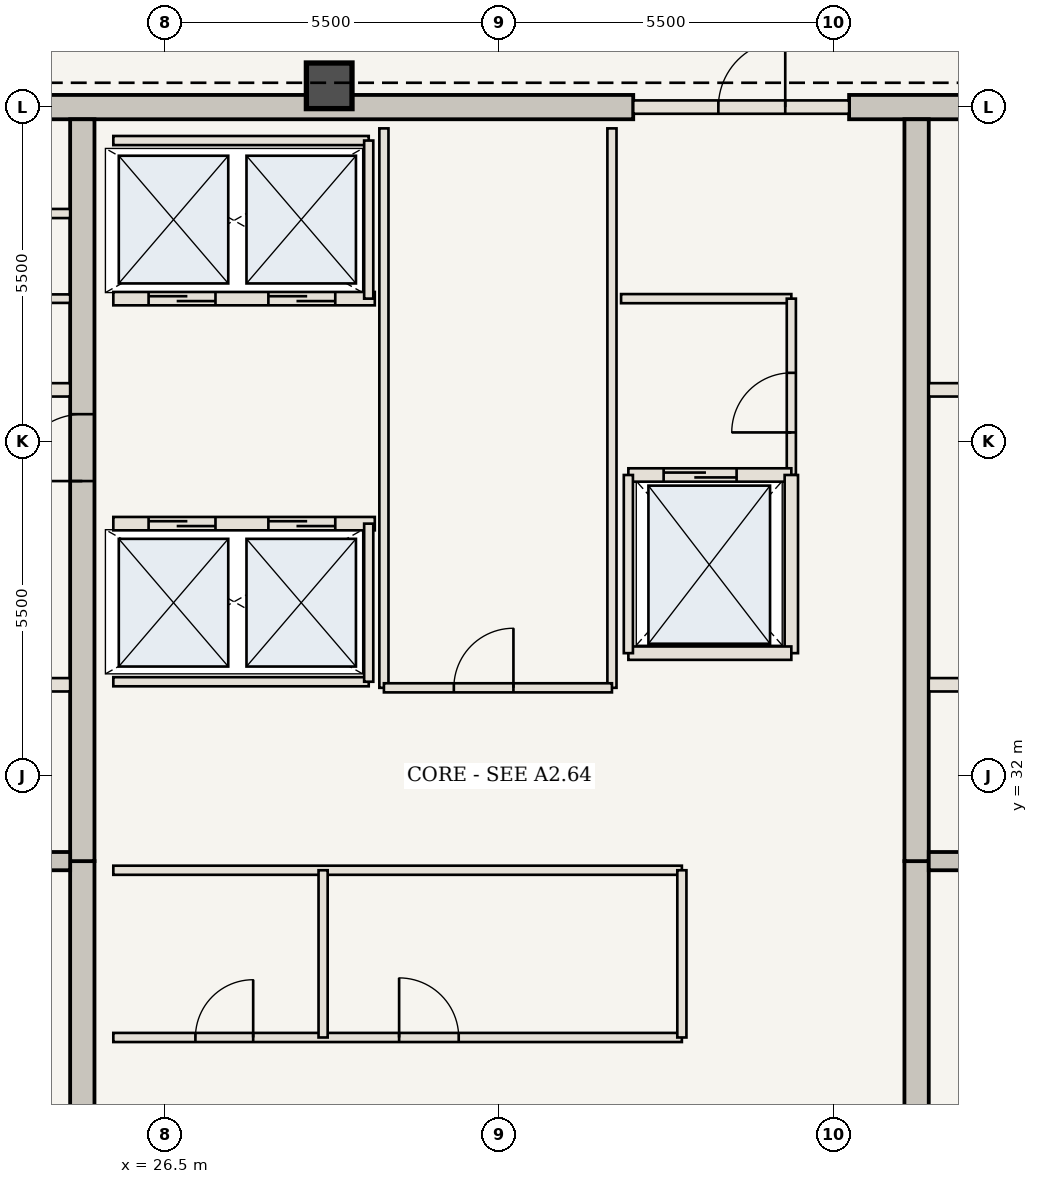
"""IFC4 building model, lengths in metres.
Left out: names, types, materials, properties, quantities, classifications, styles, units other than length and angle.
Written with IfcOpenShell. Run it as: python <this file> out.ifc"""

import sys

from ifc_helpers import new_model, si_unit, direction, frame, frame_2d, origin, origin_2d, place, context, subcontext, project, spatial, rectangle, extrude, element, fill, save


model = new_model("IFC4")
c1 = context("Model", 3, precision=1e-05, world=origin(), true_north=direction((0.0, 1.0)))
c2 = subcontext(c1, "Body", "Model", "MODEL_VIEW")
j1 = project(units=[si_unit("LENGTHUNIT", "METRE"), si_unit("PLANEANGLEUNIT", "RADIAN")], contexts=[c1])
p1 = place(None, origin())
s1 = spatial("IfcSite", under=j1, at=p1, CompositionType="ELEMENT")
p2 = place(p1, origin())
s2 = spatial("IfcBuilding", under=s1, at=p2, CompositionType="ELEMENT")
p3 = place(p2, frame((0.0, 0.0, 296.8)))
s3 = spatial("IfcBuildingStorey", under=s2, at=p3, CompositionType="ELEMENT", Elevation=296.8)
p4 = place(p3, frame((21.41, 43.0, 0.0), z_axis=(0.0, 0.0, 1.0), x_axis=(1.0, 0.0, 0.0)))
e1 = element("IfcWall", 1, at=p4, inside=s3, PredefinedType="SHEAR", context=c2, shape_type="SweptSolid", body=[
    extrude(rectangle(XDim=12.79, YDim=0.4, at=frame_2d((6.395, 0.0))), origin(), (0.0, 0.0, 1.0), 3.85),
])
p5 = place(p3, frame((37.75, 43.0, 0.0), z_axis=(0.0, 0.0, 1.0), x_axis=(1.0, 0.0, 0.0)))
e2 = element("IfcWall", 2, at=p5, inside=s3, PredefinedType="SHEAR", context=c2, shape_type="SweptSolid", body=[
    extrude(rectangle(XDim=4.84, YDim=0.4, at=frame_2d((2.42, 0.0))), origin(), (0.0, 0.0, 1.0), 3.85),
])
p6 = place(p3, frame((25.14, 21.15, 0.0), z_axis=(0.0, 0.0, 1.0), x_axis=(0.0, 1.0, 0.0)))
e3 = element("IfcWall", 3, at=p6, inside=s3, PredefinedType="SHEAR", context=c2, shape_type="SweptSolid", body=[
    extrude(rectangle(XDim=9.45, YDim=0.4, at=frame_2d((4.725, 0.0))), origin(), (0.0, 0.0, 1.0), 3.85),
])
p7 = place(p3, frame((25.14, 30.6, 0.0), z_axis=(0.0, 0.0, 1.0), x_axis=(0.0, 1.0, 0.0)))
e4 = element("IfcWall", 4, at=p7, inside=s3, PredefinedType="SHEAR", context=c2, shape_type="SweptSolid", body=[
    extrude(rectangle(XDim=12.2, YDim=0.4, at=frame_2d((6.1, 0.0))), origin(), (0.0, 0.0, 1.0), 3.85),
])
p8 = place(p7, frame((6.25, 0.0, 0.0)))
e5 = element("IfcOpeningElement", 5, at=p8, cuts=e4, PredefinedType="OPENING", context=c2, shape_type="SweptSolid", body=[
    extrude(rectangle(XDim=1.1, YDim=2.15, at=frame_2d((0.55, 1.075))), frame((0.0, 0.21, 0.0), z_axis=(0.0, -1.0, 0.0), x_axis=(1.0, 0.0, 0.0)), (0.0, 0.0, 1.0), 0.42),
])
p9 = place(p3, frame((38.86, 21.15, 0.0), z_axis=(0.0, 0.0, 1.0), x_axis=(0.0, 1.0, 0.0)))
e6 = element("IfcWall", 6, at=p9, inside=s3, PredefinedType="SHEAR", context=c2, shape_type="SweptSolid", body=[
    extrude(rectangle(XDim=9.45, YDim=0.4, at=frame_2d((4.725, 0.0))), origin(), (0.0, 0.0, 1.0), 3.85),
])
p10 = place(p3, frame((38.86, 30.6, 0.0), z_axis=(0.0, 0.0, 1.0), x_axis=(0.0, 1.0, 0.0)))
e7 = element("IfcWall", 7, at=p10, inside=s3, PredefinedType="SHEAR", context=c2, shape_type="SweptSolid", body=[
    extrude(rectangle(XDim=12.2, YDim=0.4, at=frame_2d((6.1, 0.0))), origin(), (0.0, 0.0, 1.0), 3.85),
])
p11 = place(p3, frame((29.2, 43.35, 0.0), z_axis=(0.0, 0.0, 1.0), x_axis=(1.0, 0.0, 0.0)))
e8 = element("IfcColumn", 8, at=p11, inside=s3, PredefinedType="COLUMN", context=c2, shape_type="SweptSolid", body=[
    extrude(rectangle(XDim=0.75, YDim=0.75, at=origin_2d()), origin(), (0.0, 0.0, 1.0), 3.85),
])
for number, where, z_axis, x_axis in (
    (9, (21.41, 30.6, 0.0), (0.0, 0.0, 1.0), (1.0, 0.0, 0.0)),
    (10, (39.06, 30.6, 0.0), (0.0, 0.0, 1.0), (1.0, 0.0, 0.0)),
):
    element("IfcWall", number, at=place(p3, frame(where, z_axis=z_axis, x_axis=x_axis)), inside=s3, PredefinedType="SHEAR", context=c2, shape_type="SweptSolid", body=[
        extrude(rectangle(XDim=3.53, YDim=0.3, at=frame_2d((1.765, 0.0))), origin(), (0.0, 0.0, 1.0), 3.685),
    ])
p12 = place(p3, frame((21.41, 33.5, 0.0), z_axis=(0.0, 0.0, 1.0), x_axis=(1.0, 0.0, 0.0)))
e11 = element("IfcWall", 11, at=p12, inside=s3, PredefinedType="STANDARD", context=c2, shape_type="SweptSolid", body=[
    extrude(rectangle(XDim=3.53, YDim=0.22, at=frame_2d((1.765, 0.0))), origin(), (0.0, 0.0, 1.0), 3.685),
])
p13 = place(p12, frame((0.75, 0.0, 0.0)))
e12 = element("IfcOpeningElement", 12, at=p13, cuts=e11, PredefinedType="OPENING", context=c2, shape_type="SweptSolid", body=[
    extrude(rectangle(XDim=1.2, YDim=2.2, at=frame_2d((0.6, 1.1))), frame((0.0, 0.12, 0.0), z_axis=(0.0, -1.0, 0.0), x_axis=(1.0, 0.0, 0.0)), (0.0, 0.0, 1.0), 0.24),
])
p14 = place(p3, frame((39.06, 33.5, 0.0), z_axis=(0.0, 0.0, 1.0), x_axis=(1.0, 0.0, 0.0)))
e13 = element("IfcWall", 13, at=p14, inside=s3, PredefinedType="STANDARD", context=c2, shape_type="SweptSolid", body=[
    extrude(rectangle(XDim=3.53, YDim=0.22, at=frame_2d((1.765, 0.0))), origin(), (0.0, 0.0, 1.0), 3.685),
])
p15 = place(p14, frame((1.55, 0.0, 0.0)))
e14 = element("IfcOpeningElement", 14, at=p15, cuts=e13, PredefinedType="OPENING", context=c2, shape_type="SweptSolid", body=[
    extrude(rectangle(XDim=1.2, YDim=2.2, at=frame_2d((0.6, 1.1))), frame((0.0, 0.12, 0.0), z_axis=(0.0, -1.0, 0.0), x_axis=(1.0, 0.0, 0.0)), (0.0, 0.0, 1.0), 0.24),
])
for number, where, z_axis, x_axis in (
    (15, (21.41, 38.35, 0.0), (0.0, 0.0, 1.0), (1.0, 0.0, 0.0)),
    (16, (39.06, 38.35, 0.0), (0.0, 0.0, 1.0), (1.0, 0.0, 0.0)),
):
    element("IfcWall", number, at=place(p3, frame(where, z_axis=z_axis, x_axis=x_axis)), inside=s3, PredefinedType="STANDARD", context=c2, shape_type="SweptSolid", body=[
        extrude(rectangle(XDim=3.53, YDim=0.22, at=frame_2d((1.765, 0.0))), origin(), (0.0, 0.0, 1.0), 3.685),
    ])
p16 = place(p3, frame((21.41, 39.85, 0.0), z_axis=(0.0, 0.0, 1.0), x_axis=(1.0, 0.0, 0.0)))
e17 = element("IfcWall", 17, at=p16, inside=s3, PredefinedType="STANDARD", context=c2, shape_type="SweptSolid", body=[
    extrude(rectangle(XDim=3.53, YDim=0.14, at=frame_2d((1.765, 0.0))), origin(), (0.0, 0.0, 1.0), 3.685),
])
p17 = place(p3, frame((21.41, 41.25, 0.0), z_axis=(0.0, 0.0, 1.0), x_axis=(1.0, 0.0, 0.0)))
e18 = element("IfcWall", 18, at=p17, inside=s3, PredefinedType="STANDARD", context=c2, shape_type="SweptSolid", body=[
    extrude(rectangle(XDim=3.53, YDim=0.15, at=frame_2d((1.765, 0.0))), origin(), (0.0, 0.0, 1.0), 3.685),
])
p18 = place(p3, frame((34.0, 39.85, 0.0), z_axis=(0.0, 0.0, 1.0), x_axis=(1.0, 0.0, 0.0)))
e19 = element("IfcWall", 19, at=p18, inside=s3, PredefinedType="STANDARD", context=c2, shape_type="SweptSolid", body=[
    extrude(rectangle(XDim=2.8, YDim=0.15, at=frame_2d((1.4, 0.0))), origin(), (0.0, 0.0, 1.0), 3.685),
])
p19 = place(p3, frame((36.8, 36.95, 0.0), z_axis=(0.0, 0.0, 1.0), x_axis=(0.0, 1.0, 0.0)))
e20 = element("IfcWall", 20, at=p19, inside=s3, PredefinedType="STANDARD", context=c2, shape_type="SweptSolid", body=[
    extrude(rectangle(XDim=2.9, YDim=0.15, at=frame_2d((1.45, 0.0))), origin(), (0.0, 0.0, 1.0), 3.685),
])
p20 = place(p19, frame((0.7, 0.0, 0.0)))
e21 = element("IfcOpeningElement", 21, at=p20, cuts=e20, PredefinedType="OPENING", context=c2, shape_type="SweptSolid", body=[
    extrude(rectangle(XDim=0.98, YDim=2.2, at=frame_2d((0.49, 1.1))), frame((0.0, 0.085, 0.0), z_axis=(0.0, -1.0, 0.0), x_axis=(1.0, 0.0, 0.0)), (0.0, 0.0, 1.0), 0.17),
])
p21 = place(p3, frame((25.65, 27.7, 0.0), z_axis=(0.0, 0.0, 1.0), x_axis=(1.0, 0.0, 0.0)))
e22 = element("IfcWall", 22, at=p21, inside=s3, PredefinedType="STANDARD", context=c2, shape_type="SweptSolid", body=[
    extrude(rectangle(XDim=9.35, YDim=0.15, at=frame_2d((4.675, 0.0))), origin(), (0.0, 0.0, 1.0), 3.685),
])
p22 = place(p21, frame((1.35, 0.0, 0.0)))
e23 = element("IfcOpeningElement", 23, at=p22, cuts=e22, PredefinedType="OPENING", context=c2, shape_type="SweptSolid", body=[
    extrude(rectangle(XDim=0.95, YDim=2.15, at=frame_2d((0.475, 1.075))), frame((0.0, 0.085, 0.0), z_axis=(0.0, -1.0, 0.0), x_axis=(1.0, 0.0, 0.0)), (0.0, 0.0, 1.0), 0.17),
])
p23 = place(p21, frame((4.7, 0.0, 0.0)))
e24 = element("IfcOpeningElement", 24, at=p23, cuts=e22, PredefinedType="OPENING", context=c2, shape_type="SweptSolid", body=[
    extrude(rectangle(XDim=0.98, YDim=2.2, at=frame_2d((0.49, 1.1))), frame((0.0, 0.085, 0.0), z_axis=(0.0, -1.0, 0.0), x_axis=(1.0, 0.0, 0.0)), (0.0, 0.0, 1.0), 0.17),
])
p24 = place(p3, frame((25.65, 30.45, 0.0), z_axis=(0.0, 0.0, 1.0), x_axis=(1.0, 0.0, 0.0)))
e25 = element("IfcWall", 25, at=p24, inside=s3, PredefinedType="STANDARD", context=c2, shape_type="SweptSolid", body=[
    extrude(rectangle(XDim=9.35, YDim=0.15, at=frame_2d((4.675, 0.0))), origin(), (0.0, 0.0, 1.0), 3.685),
])
for number, where, z_axis, x_axis in (
    (26, (29.1, 27.7, 0.0), (0.0, 0.0, 1.0), (0.0, 1.0, 0.0)),
    (27, (35.0, 27.7, 0.0), (0.0, 0.0, 1.0), (0.0, 1.0, 0.0)),
):
    element("IfcWall", number, at=place(p3, frame(where, z_axis=z_axis, x_axis=x_axis)), inside=s3, PredefinedType="STANDARD", context=c2, shape_type="SweptSolid", body=[
        extrude(rectangle(XDim=2.75, YDim=0.15, at=frame_2d((1.375, 0.0))), origin(), (0.0, 0.0, 1.0), 3.685),
    ])
p25 = place(p3, frame((25.65, 36.15, 0.0), z_axis=(0.0, 0.0, 1.0), x_axis=(1.0, 0.0, 0.0)))
e28 = element("IfcWall", 28, at=p25, inside=s3, PredefinedType="STANDARD", context=c2, shape_type="SweptSolid", body=[
    extrude(rectangle(XDim=4.3, YDim=0.22, at=frame_2d((2.15, 0.0))), origin(), (0.0, 0.0, 1.0), 3.685),
])
p26 = place(p25, frame((0.58, 0.0, 0.0)))
e29 = element("IfcOpeningElement", 29, at=p26, cuts=e28, PredefinedType="OPENING", context=c2, shape_type="SweptSolid", body=[
    extrude(rectangle(XDim=1.1, YDim=2.15, at=frame_2d((0.55, 1.075))), frame((0.0, 0.12, 0.0), z_axis=(0.0, -1.0, 0.0), x_axis=(1.0, 0.0, 0.0)), (0.0, 0.0, 1.0), 0.24),
])
p27 = place(p25, frame((2.55, 0.0, 0.0)))
e30 = element("IfcOpeningElement", 30, at=p27, cuts=e28, PredefinedType="OPENING", context=c2, shape_type="SweptSolid", body=[
    extrude(rectangle(XDim=1.1, YDim=2.15, at=frame_2d((0.55, 1.075))), frame((0.0, 0.12, 0.0), z_axis=(0.0, -1.0, 0.0), x_axis=(1.0, 0.0, 0.0)), (0.0, 0.0, 1.0), 0.24),
])
p28 = place(p3, frame((25.65, 33.55, 0.0), z_axis=(0.0, 0.0, 1.0), x_axis=(1.0, 0.0, 0.0)))
e31 = element("IfcWall", 31, at=p28, inside=s3, PredefinedType="STANDARD", context=c2, shape_type="SweptSolid", body=[
    extrude(rectangle(XDim=4.2, YDim=0.15, at=frame_2d((2.1, 0.0))), origin(), (0.0, 0.0, 1.0), 3.685),
])
p29 = place(p3, frame((29.85, 33.55, 0.0), z_axis=(0.0, 0.0, 1.0), x_axis=(0.0, 1.0, 0.0)))
e32 = element("IfcWall", 32, at=p29, inside=s3, PredefinedType="STANDARD", context=c2, shape_type="SweptSolid", body=[
    extrude(rectangle(XDim=2.6, YDim=0.15, at=frame_2d((1.3, 0.0))), origin(), (0.0, 0.0, 1.0), 3.685),
])
p30 = place(p3, frame((25.65, 39.85, 0.0), z_axis=(0.0, 0.0, 1.0), x_axis=(1.0, 0.0, 0.0)))
e33 = element("IfcWall", 33, at=p30, inside=s3, PredefinedType="STANDARD", context=c2, shape_type="SweptSolid", body=[
    extrude(rectangle(XDim=4.3, YDim=0.22, at=frame_2d((2.15, 0.0))), origin(), (0.0, 0.0, 1.0), 3.685),
])
p31 = place(p30, frame((0.58, 0.0, 0.0)))
e34 = element("IfcOpeningElement", 34, at=p31, cuts=e33, PredefinedType="OPENING", context=c2, shape_type="SweptSolid", body=[
    extrude(rectangle(XDim=1.1, YDim=2.15, at=frame_2d((0.55, 1.075))), frame((0.0, 0.12, 0.0), z_axis=(0.0, -1.0, 0.0), x_axis=(1.0, 0.0, 0.0)), (0.0, 0.0, 1.0), 0.24),
])
p32 = place(p30, frame((2.55, 0.0, 0.0)))
e35 = element("IfcOpeningElement", 35, at=p32, cuts=e33, PredefinedType="OPENING", context=c2, shape_type="SweptSolid", body=[
    extrude(rectangle(XDim=1.1, YDim=2.15, at=frame_2d((0.55, 1.075))), frame((0.0, 0.12, 0.0), z_axis=(0.0, -1.0, 0.0), x_axis=(1.0, 0.0, 0.0)), (0.0, 0.0, 1.0), 0.24),
])
p33 = place(p3, frame((25.65, 42.45, 0.0), z_axis=(0.0, 0.0, 1.0), x_axis=(1.0, 0.0, 0.0)))
e36 = element("IfcWall", 36, at=p33, inside=s3, PredefinedType="STANDARD", context=c2, shape_type="SweptSolid", body=[
    extrude(rectangle(XDim=4.2, YDim=0.15, at=frame_2d((2.1, 0.0))), origin(), (0.0, 0.0, 1.0), 3.685),
])
p34 = place(p3, frame((29.85, 39.85, 0.0), z_axis=(0.0, 0.0, 1.0), x_axis=(0.0, 1.0, 0.0)))
e37 = element("IfcWall", 37, at=p34, inside=s3, PredefinedType="STANDARD", context=c2, shape_type="SweptSolid", body=[
    extrude(rectangle(XDim=2.6, YDim=0.15, at=frame_2d((1.3, 0.0))), origin(), (0.0, 0.0, 1.0), 3.685),
])
for number, where, z_axis, x_axis in (
    (38, (30.1, 33.45, 0.0), (0.0, 0.0, 1.0), (0.0, 1.0, 0.0)),
    (39, (33.85, 33.45, 0.0), (0.0, 0.0, 1.0), (0.0, 1.0, 0.0)),
):
    element("IfcWall", number, at=place(p3, frame(where, z_axis=z_axis, x_axis=x_axis)), inside=s3, PredefinedType="STANDARD", context=c2, shape_type="SweptSolid", body=[
        extrude(rectangle(XDim=9.2, YDim=0.15, at=frame_2d((4.6, 0.0))), origin(), (0.0, 0.0, 1.0), 3.685),
    ])
p35 = place(p3, frame((30.1, 33.45, 0.0), z_axis=(0.0, 0.0, 1.0), x_axis=(1.0, 0.0, 0.0)))
e40 = element("IfcWall", 40, at=p35, inside=s3, PredefinedType="STANDARD", context=c2, shape_type="SweptSolid", body=[
    extrude(rectangle(XDim=3.75, YDim=0.15, at=frame_2d((1.875, 0.0))), origin(), (0.0, 0.0, 1.0), 3.685),
])
p36 = place(p35, frame((1.15, 0.0, 0.0)))
e41 = element("IfcOpeningElement", 41, at=p36, cuts=e40, PredefinedType="OPENING", context=c2, shape_type="SweptSolid", body=[
    extrude(rectangle(XDim=0.98, YDim=2.2, at=frame_2d((0.49, 1.1))), frame((0.0, 0.085, 0.0), z_axis=(0.0, -1.0, 0.0), x_axis=(1.0, 0.0, 0.0)), (0.0, 0.0, 1.0), 0.17),
])
p37 = place(p3, frame((34.2, 43.0, 0.0), z_axis=(0.0, 0.0, 1.0), x_axis=(1.0, 0.0, 0.0)))
e42 = element("IfcWall", 42, at=p37, inside=s3, PredefinedType="STANDARD", context=c2, shape_type="SweptSolid", body=[
    extrude(rectangle(XDim=3.55, YDim=0.22, at=frame_2d((1.775, 0.0))), origin(), (0.0, 0.0, 1.0), 3.685),
])
p38 = place(p37, frame((1.4, 0.0, 0.0)))
e43 = element("IfcOpeningElement", 43, at=p38, cuts=e42, PredefinedType="OPENING", context=c2, shape_type="SweptSolid", body=[
    extrude(rectangle(XDim=1.1, YDim=2.15, at=frame_2d((0.55, 1.075))), frame((0.0, 0.12, 0.0), z_axis=(0.0, -1.0, 0.0), x_axis=(1.0, 0.0, 0.0)), (0.0, 0.0, 1.0), 0.24),
])
p39 = place(p3, frame((34.12, 36.95, 0.0), z_axis=(0.0, 0.0, 1.0), x_axis=(1.0, 0.0, 0.0)))
e44 = element("IfcWall", 44, at=p39, inside=s3, PredefinedType="STANDARD", context=c2, shape_type="SweptSolid", body=[
    extrude(rectangle(XDim=2.68, YDim=0.22, at=frame_2d((1.34, 0.0))), origin(), (0.0, 0.0, 1.0), 3.685),
])
p40 = place(p39, frame((0.58, 0.0, 0.0)))
e45 = element("IfcOpeningElement", 45, at=p40, cuts=e44, PredefinedType="OPENING", context=c2, shape_type="SweptSolid", body=[
    extrude(rectangle(XDim=1.2, YDim=2.2, at=frame_2d((0.6, 1.1))), frame((0.0, 0.12, 0.0), z_axis=(0.0, -1.0, 0.0), x_axis=(1.0, 0.0, 0.0)), (0.0, 0.0, 1.0), 0.24),
])
p41 = place(p3, frame((36.8, 34.02, 0.0), z_axis=(0.0, 0.0, 1.0), x_axis=(0.0, 1.0, 0.0)))
e46 = element("IfcWall", 46, at=p41, inside=s3, PredefinedType="STANDARD", context=c2, shape_type="SweptSolid", body=[
    extrude(rectangle(XDim=2.93, YDim=0.22, at=frame_2d((1.465, 0.0))), origin(), (0.0, 0.0, 1.0), 3.685),
])
p42 = place(p3, frame((34.12, 34.02, 0.0), z_axis=(0.0, 0.0, 1.0), x_axis=(1.0, 0.0, 0.0)))
e47 = element("IfcWall", 47, at=p42, inside=s3, PredefinedType="STANDARD", context=c2, shape_type="SweptSolid", body=[
    extrude(rectangle(XDim=2.68, YDim=0.22, at=frame_2d((1.34, 0.0))), origin(), (0.0, 0.0, 1.0), 3.685),
])
p43 = place(p3, frame((34.12, 34.02, 0.0), z_axis=(0.0, 0.0, 1.0), x_axis=(0.0, 1.0, 0.0)))
e48 = element("IfcWall", 48, at=p43, inside=s3, PredefinedType="STANDARD", context=c2, shape_type="SweptSolid", body=[
    extrude(rectangle(XDim=2.93, YDim=0.15, at=frame_2d((1.465, 0.0))), origin(), (0.0, 0.0, 1.0), 3.685),
])
p44 = place(p8, origin())
e49 = element("IfcDoor", 49, at=p44, inside=s3, OperationType="SINGLE_SWING_LEFT", PredefinedType="DOOR", context=c2, shape_type="SweptSolid", body=[
    extrude(rectangle(XDim=1.1, YDim=2.15, at=frame_2d((0.55, 1.075))), frame((0.0, 0.025, 0.0), z_axis=(0.0, -1.0, 0.0), x_axis=(1.0, 0.0, 0.0)), (0.0, 0.0, 1.0), 0.05),
])
fill(e5, e49)
p45 = place(p20, origin())
e50 = element("IfcDoor", 50, at=p45, inside=s3, OperationType="SINGLE_SWING_LEFT", PredefinedType="DOOR", context=c2, shape_type="SweptSolid", body=[
    extrude(rectangle(XDim=0.98, YDim=2.2, at=frame_2d((0.49, 1.1))), frame((0.0, 0.025, 0.0), z_axis=(0.0, -1.0, 0.0), x_axis=(1.0, 0.0, 0.0)), (0.0, 0.0, 1.0), 0.05),
])
fill(e21, e50)
p46 = place(p22, origin())
e51 = element("IfcDoor", 51, at=p46, inside=s3, OperationType="SINGLE_SWING_RIGHT", PredefinedType="DOOR", context=c2, shape_type="SweptSolid", body=[
    extrude(rectangle(XDim=0.95, YDim=2.15, at=frame_2d((0.475, 1.075))), frame((0.0, 0.025, 0.0), z_axis=(0.0, -1.0, 0.0), x_axis=(1.0, 0.0, 0.0)), (0.0, 0.0, 1.0), 0.05),
])
fill(e23, e51)
p47 = place(p23, origin())
e52 = element("IfcDoor", 52, at=p47, inside=s3, OperationType="SINGLE_SWING_LEFT", PredefinedType="DOOR", context=c2, shape_type="SweptSolid", body=[
    extrude(rectangle(XDim=0.98, YDim=2.2, at=frame_2d((0.49, 1.1))), frame((0.0, 0.025, 0.0), z_axis=(0.0, -1.0, 0.0), x_axis=(1.0, 0.0, 0.0)), (0.0, 0.0, 1.0), 0.05),
])
fill(e24, e52)
p48 = place(p26, origin())
e53 = element("IfcDoor", 53, at=p48, inside=s3, OperationType="DOUBLE_DOOR_SLIDING", PredefinedType="DOOR", context=c2, shape_type="SweptSolid", body=[
    extrude(rectangle(XDim=1.1, YDim=2.15, at=frame_2d((0.55, 1.075))), frame((0.0, 0.025, 0.0), z_axis=(0.0, -1.0, 0.0), x_axis=(1.0, 0.0, 0.0)), (0.0, 0.0, 1.0), 0.05),
])
fill(e29, e53)
p49 = place(p27, origin())
e54 = element("IfcDoor", 54, at=p49, inside=s3, OperationType="DOUBLE_DOOR_SLIDING", PredefinedType="DOOR", context=c2, shape_type="SweptSolid", body=[
    extrude(rectangle(XDim=1.1, YDim=2.15, at=frame_2d((0.55, 1.075))), frame((0.0, 0.025, 0.0), z_axis=(0.0, -1.0, 0.0), x_axis=(1.0, 0.0, 0.0)), (0.0, 0.0, 1.0), 0.05),
])
fill(e30, e54)
p50 = place(p31, origin())
e55 = element("IfcDoor", 55, at=p50, inside=s3, OperationType="DOUBLE_DOOR_SLIDING", PredefinedType="DOOR", context=c2, shape_type="SweptSolid", body=[
    extrude(rectangle(XDim=1.1, YDim=2.15, at=frame_2d((0.55, 1.075))), frame((0.0, 0.025, 0.0), z_axis=(0.0, -1.0, 0.0), x_axis=(1.0, 0.0, 0.0)), (0.0, 0.0, 1.0), 0.05),
])
fill(e34, e55)
p51 = place(p32, origin())
e56 = element("IfcDoor", 56, at=p51, inside=s3, OperationType="DOUBLE_DOOR_SLIDING", PredefinedType="DOOR", context=c2, shape_type="SweptSolid", body=[
    extrude(rectangle(XDim=1.1, YDim=2.15, at=frame_2d((0.55, 1.075))), frame((0.0, 0.025, 0.0), z_axis=(0.0, -1.0, 0.0), x_axis=(1.0, 0.0, 0.0)), (0.0, 0.0, 1.0), 0.05),
])
fill(e35, e56)
p52 = place(p36, origin())
e57 = element("IfcDoor", 57, at=p52, inside=s3, OperationType="SINGLE_SWING_RIGHT", PredefinedType="DOOR", context=c2, shape_type="SweptSolid", body=[
    extrude(rectangle(XDim=0.98, YDim=2.2, at=frame_2d((0.49, 1.1))), frame((0.0, 0.025, 0.0), z_axis=(0.0, -1.0, 0.0), x_axis=(1.0, 0.0, 0.0)), (0.0, 0.0, 1.0), 0.05),
])
fill(e41, e57)
p53 = place(p38, origin())
e58 = element("IfcDoor", 58, at=p53, inside=s3, OperationType="SINGLE_SWING_RIGHT", PredefinedType="DOOR", context=c2, shape_type="SweptSolid", body=[
    extrude(rectangle(XDim=1.1, YDim=2.15, at=frame_2d((0.55, 1.075))), frame((0.0, 0.025, 0.0), z_axis=(0.0, -1.0, 0.0), x_axis=(1.0, 0.0, 0.0)), (0.0, 0.0, 1.0), 0.05),
])
fill(e43, e58)
p54 = place(p40, origin())
e59 = element("IfcDoor", 59, at=p54, inside=s3, OperationType="DOUBLE_DOOR_SLIDING", PredefinedType="DOOR", context=c2, shape_type="SweptSolid", body=[
    extrude(rectangle(XDim=1.2, YDim=2.2, at=frame_2d((0.6, 1.1))), frame((0.0, 0.025, 0.0), z_axis=(0.0, -1.0, 0.0), x_axis=(1.0, 0.0, 0.0)), (0.0, 0.0, 1.0), 0.05),
])
fill(e45, e59)
save(model, sys.argv[1])
